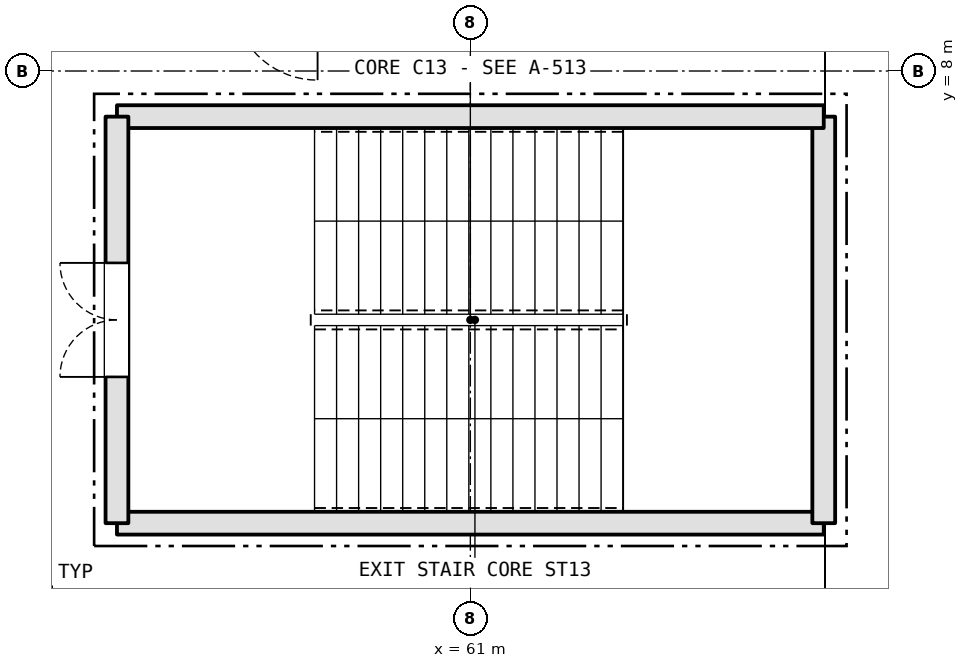
"""IFC4 building model, lengths in metres.
Left out: names, types, materials, properties, quantities, classifications, styles, units other than length and angle.
Written with IfcOpenShell. Run it as: python <this file> out.ifc"""

import sys

from ifc_helpers import new_model, si_unit, direction, frame, frame_2d, origin, place, context, subcontext, project, spatial, rectangle, extrude, element, fill, save


model = new_model("IFC4")
c1 = context("Model", 3, precision=1e-05, world=origin(), true_north=direction((0.0, 1.0)))
c2 = subcontext(c1, "Body", "Model", "MODEL_VIEW")
j1 = project(units=[si_unit("LENGTHUNIT", "METRE"), si_unit("PLANEANGLEUNIT", "RADIAN")], contexts=[c1])
p1 = place(None, origin())
s1 = spatial("IfcSite", under=j1, at=p1, CompositionType="ELEMENT")
p2 = place(p1, origin())
s2 = spatial("IfcBuilding", under=s1, at=p2, CompositionType="ELEMENT")
p3 = place(p2, origin())
s3 = spatial("IfcBuildingStorey", under=s2, at=p3, CompositionType="ELEMENT", Elevation=0.0)
p4 = place(p3, frame((56.35, 2.05, 0.0), z_axis=(0.0, 0.0, 1.0), x_axis=(1.0, 0.0, 0.0)))
e1 = element("IfcWall", 1, at=p4, inside=s3, PredefinedType="SHEAR", context=c2, shape_type="SweptSolid", body=[
    extrude(rectangle(XDim=9.299, YDim=0.3, at=frame_2d((4.65, 0.0))), origin(), (0.0, 0.0, 1.0), 5.14),
])
p5 = place(p3, frame((65.65, 2.05, 0.0), z_axis=(0.0, 0.0, 1.0), x_axis=(0.0, 1.0, 0.0)))
e2 = element("IfcWall", 2, at=p5, inside=s3, PredefinedType="SHEAR", context=c2, shape_type="SweptSolid", body=[
    extrude(rectangle(XDim=5.349, YDim=0.3, at=frame_2d((2.675, 0.0))), origin(), (0.0, 0.0, 1.0), 5.14),
])
p6 = place(p3, frame((65.65, 7.4, 0.0), z_axis=(0.0, 0.0, 1.0), x_axis=(-1.0, 0.0, 0.0)))
e3 = element("IfcWall", 3, at=p6, inside=s3, PredefinedType="SHEAR", context=c2, shape_type="SweptSolid", body=[
    extrude(rectangle(XDim=9.299, YDim=0.3, at=frame_2d((4.65, 0.0))), origin(), (0.0, 0.0, 1.0), 5.14),
])
p7 = place(p3, frame((56.35, 7.4, 0.0), z_axis=(0.0, 0.0, 1.0), x_axis=(0.0, -1.0, 0.0)))
e4 = element("IfcWall", 4, at=p7, inside=s3, PredefinedType="SHEAR", context=c2, shape_type="SweptSolid", body=[
    extrude(rectangle(XDim=5.349, YDim=0.3, at=frame_2d((2.675, 0.0))), origin(), (0.0, 0.0, 1.0), 5.14),
])
p8 = place(p7, frame((1.925, 0.0, 0.0)))
e5 = element("IfcOpeningElement", 5, at=p8, cuts=e4, PredefinedType="OPENING", context=c2, shape_type="SweptSolid", body=[
    extrude(rectangle(XDim=1.5, YDim=2.2, at=frame_2d((0.75, 1.1))), frame((0.0, 0.16, 0.0), z_axis=(0.0, -1.0, 0.0), x_axis=(1.0, 0.0, 0.0)), (0.0, 0.0, 1.0), 0.32),
])
p9 = place(p8, frame((1.5, 0.0, 0.0), z_axis=(0.0, 0.0, 1.0), x_axis=(-1.0, 0.0, 0.0)))
e6 = element("IfcDoor", 6, at=p9, inside=s3, OperationType="DOUBLE_DOOR_SINGLE_SWING", PredefinedType="DOOR", context=c2, shape_type="SweptSolid", body=[
    extrude(rectangle(XDim=1.5, YDim=2.2, at=frame_2d((0.75, 1.1))), frame((0.0, 0.025, 0.0), z_axis=(0.0, -1.0, 0.0), x_axis=(1.0, 0.0, 0.0)), (0.0, 0.0, 1.0), 0.05),
])
fill(e5, e6)
save(model, sys.argv[1])
